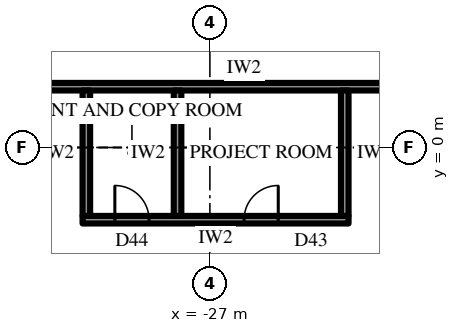
"""IFC4 building model, lengths in metres.
Left out: names, types, materials, properties, quantities, classifications, styles, units other than length and angle.
Written with IfcOpenShell. Run it as: python <this file> out.ifc"""

import sys

from ifc_helpers import new_model, si_unit, direction, frame, frame_2d, origin, place, context, subcontext, project, spatial, rectangle, extrude, element, fill, save


model = new_model("IFC4")
c1 = context("Model", 3, precision=1e-05, world=origin(), true_north=direction((0.0, 1.0)))
c2 = subcontext(c1, "Body", "Model", "MODEL_VIEW")
j1 = project(units=[si_unit("LENGTHUNIT", "METRE"), si_unit("PLANEANGLEUNIT", "RADIAN")], contexts=[c1])
p1 = place(None, origin())
s1 = spatial("IfcSite", under=j1, at=p1, CompositionType="ELEMENT")
p2 = place(p1, origin())
s2 = spatial("IfcBuilding", under=s1, at=p2, CompositionType="ELEMENT")
p3 = place(p2, frame((0.0, 0.0, 148.9)))
s3 = spatial("IfcBuildingStorey", under=s2, at=p3, CompositionType="ELEMENT", Elevation=148.9)
p4 = place(p3, frame((-34.656, -2.675, 0.0), z_axis=(0.0, 0.0, 1.0), x_axis=(0.500003084452, -0.866023622968, 0.0)))
e1 = element("IfcWall", 1, at=p4, inside=s3, PredefinedType="SOLIDWALL", context=c2, shape_type="SweptSolid", body=[
    extrude(rectangle(XDim=30.022, YDim=0.3, at=frame_2d((15.011, 0.0))), origin(), (0.0, 0.0, 1.0), 2.75),
])
p5 = place(p4, frame((1.052, 0.0, 0.6)))
e2 = element("IfcOpeningElement", 2, at=p5, cuts=e1, PredefinedType="OPENING", context=c2, shape_type="SweptSolid", body=[
    extrude(rectangle(XDim=2.9, YDim=1.9, at=frame_2d((1.45, 0.95))), frame((0.0, 0.16, 0.0), z_axis=(0.0, -1.0, 0.0), x_axis=(1.0, 0.0, 0.0)), (0.0, 0.0, 1.0), 0.32),
])
p6 = place(p4, frame((6.056, 0.0, 0.6)))
e3 = element("IfcOpeningElement", 3, at=p6, cuts=e1, PredefinedType="OPENING", context=c2, shape_type="SweptSolid", body=[
    extrude(rectangle(XDim=2.9, YDim=1.9, at=frame_2d((1.45, 0.95))), frame((0.0, 0.16, 0.0), z_axis=(0.0, -1.0, 0.0), x_axis=(1.0, 0.0, 0.0)), (0.0, 0.0, 1.0), 0.32),
])
p7 = place(p4, frame((11.909, 0.0, 0.0)))
e4 = element("IfcOpeningElement", 4, at=p7, cuts=e1, PredefinedType="OPENING", context=c2, shape_type="SweptSolid", body=[
    extrude(rectangle(XDim=1.2, YDim=2.4, at=frame_2d((0.6, 1.2))), frame((0.0, 0.16, 0.0), z_axis=(0.0, -1.0, 0.0), x_axis=(1.0, 0.0, 0.0)), (0.0, 0.0, 1.0), 0.32),
])
p8 = place(p4, frame((16.063, 0.0, 0.6)))
e5 = element("IfcOpeningElement", 5, at=p8, cuts=e1, PredefinedType="OPENING", context=c2, shape_type="SweptSolid", body=[
    extrude(rectangle(XDim=2.9, YDim=1.9, at=frame_2d((1.45, 0.95))), frame((0.0, 0.16, 0.0), z_axis=(0.0, -1.0, 0.0), x_axis=(1.0, 0.0, 0.0)), (0.0, 0.0, 1.0), 0.32),
])
p9 = place(p4, frame((21.067, 0.0, 0.6)))
e6 = element("IfcOpeningElement", 6, at=p9, cuts=e1, PredefinedType="OPENING", context=c2, shape_type="SweptSolid", body=[
    extrude(rectangle(XDim=2.9, YDim=1.9, at=frame_2d((1.45, 0.95))), frame((0.0, 0.16, 0.0), z_axis=(0.0, -1.0, 0.0), x_axis=(1.0, 0.0, 0.0)), (0.0, 0.0, 1.0), 0.32),
])
p10 = place(p4, frame((26.07, 0.0, 0.6)))
e7 = element("IfcOpeningElement", 7, at=p10, cuts=e1, PredefinedType="OPENING", context=c2, shape_type="SweptSolid", body=[
    extrude(rectangle(XDim=2.9, YDim=1.9, at=frame_2d((1.45, 0.95))), frame((0.0, 0.16, 0.0), z_axis=(0.0, -1.0, 0.0), x_axis=(1.0, 0.0, 0.0)), (0.0, 0.0, 1.0), 0.32),
])
p11 = place(p3, frame((-18.6, 1.6, 0.0), z_axis=(0.0, 0.0, 1.0), x_axis=(-1.0, 0.0, 0.0)))
e8 = element("IfcWall", 8, at=p11, inside=s3, PredefinedType="PARTITIONING", context=c2, shape_type="SweptSolid", body=[
    extrude(rectangle(XDim=15.002, YDim=0.2, at=frame_2d((7.501, 0.0))), origin(), (0.0, 0.0, 1.0), 4.0),
])
p12 = place(p11, frame((1.0, 0.0, 0.0)))
e9 = element("IfcOpeningElement", 9, at=p12, cuts=e8, PredefinedType="OPENING", context=c2, shape_type="SweptSolid", body=[
    extrude(rectangle(XDim=1.0, YDim=2.2, at=frame_2d((0.5, 1.1))), frame((0.0, 0.11, 0.0), z_axis=(0.0, -1.0, 0.0), x_axis=(1.0, 0.0, 0.0)), (0.0, 0.0, 1.0), 0.22),
])
p13 = place(p3, frame((-23.351, -1.9, 0.0), z_axis=(0.0, 0.0, 1.0), x_axis=(-1.0, 0.0, 0.0)))
e10 = element("IfcWall", 10, at=p13, inside=s3, PredefinedType="PARTITIONING", context=c2, shape_type="SweptSolid", body=[
    extrude(rectangle(XDim=7.0, YDim=0.2, at=frame_2d((3.5, 0.0))), origin(), (0.0, 0.0, 1.0), 4.0),
])
p14 = place(p13, frame((1.85, 0.0, 0.0)))
e11 = element("IfcOpeningElement", 11, at=p14, cuts=e10, PredefinedType="OPENING", context=c2, shape_type="SweptSolid", body=[
    extrude(rectangle(XDim=0.9, YDim=2.2, at=frame_2d((0.45, 1.1))), frame((0.0, 0.11, 0.0), z_axis=(0.0, -1.0, 0.0), x_axis=(1.0, 0.0, 0.0)), (0.0, 0.0, 1.0), 0.22),
])
p15 = place(p13, frame((5.25, 0.0, 0.0)))
e12 = element("IfcOpeningElement", 12, at=p15, cuts=e10, PredefinedType="OPENING", context=c2, shape_type="SweptSolid", body=[
    extrude(rectangle(XDim=0.9, YDim=2.2, at=frame_2d((0.45, 1.1))), frame((0.0, 0.11, 0.0), z_axis=(0.0, -1.0, 0.0), x_axis=(1.0, 0.0, 0.0)), (0.0, 0.0, 1.0), 0.22),
])
for number, where, z_axis, x_axis in (
    (13, (-23.451, 1.5, 0.0), (0.0, 0.0, 1.0), (0.0, -1.0, 0.0)),
    (14, (-27.851, 1.5, 0.0), (0.0, 0.0, 1.0), (0.0, -1.0, 0.0)),
    (15, (-30.251, 1.5, 0.0), (0.0, 0.0, 1.0), (0.0, -1.0, 0.0)),
):
    element("IfcWall", number, at=place(p3, frame(where, z_axis=z_axis, x_axis=x_axis)), inside=s3, PredefinedType="PARTITIONING", context=c2, shape_type="SweptSolid", body=[
        extrude(rectangle(XDim=3.3, YDim=0.2, at=frame_2d((1.65, 0.0))), origin(), (0.0, 0.0, 1.0), 4.0),
    ])
p16 = place(p14, frame((0.9, 0.0, 0.0), z_axis=(0.0, 0.0, 1.0), x_axis=(-1.0, 0.0, 0.0)))
e16 = element("IfcDoor", 16, at=p16, inside=s3, OperationType="SINGLE_SWING_LEFT", PredefinedType="DOOR", context=c2, shape_type="SweptSolid", body=[
    extrude(rectangle(XDim=0.9, YDim=2.2, at=frame_2d((0.45, 1.1))), frame((0.0, 0.025, 0.0), z_axis=(0.0, -1.0, 0.0), x_axis=(1.0, 0.0, 0.0)), (0.0, 0.0, 1.0), 0.05),
])
fill(e11, e16)
p17 = place(p15, frame((0.9, 0.0, 0.0), z_axis=(0.0, 0.0, 1.0), x_axis=(-1.0, 0.0, 0.0)))
e17 = element("IfcDoor", 17, at=p17, inside=s3, OperationType="SINGLE_SWING_RIGHT", PredefinedType="DOOR", context=c2, shape_type="SweptSolid", body=[
    extrude(rectangle(XDim=0.9, YDim=2.2, at=frame_2d((0.45, 1.1))), frame((0.0, 0.025, 0.0), z_axis=(0.0, -1.0, 0.0), x_axis=(1.0, 0.0, 0.0)), (0.0, 0.0, 1.0), 0.05),
])
fill(e12, e17)
save(model, sys.argv[1])
